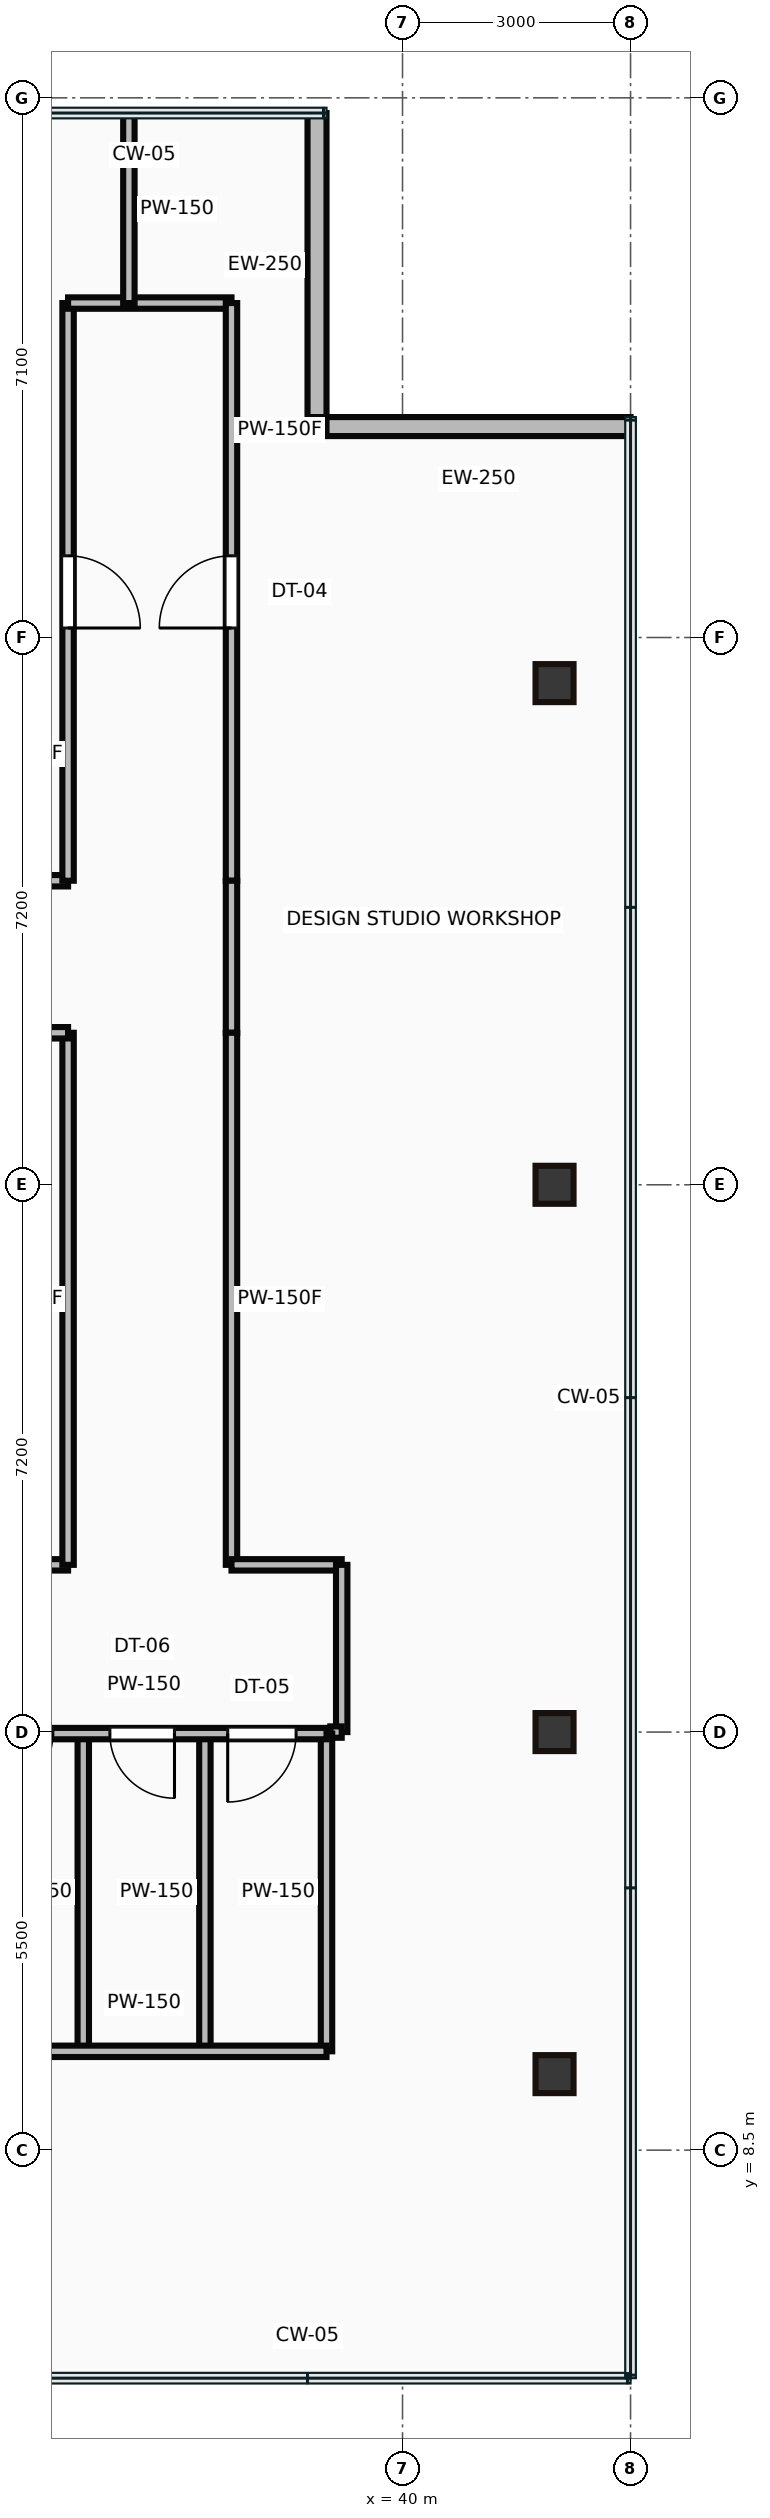
"""IFC4 building model, lengths in metres.
Left out: names, types, materials, properties, quantities, classifications, styles, units other than length and angle.
Written with IfcOpenShell. Run it as: python <this file> out.ifc"""

import sys

from ifc_helpers import new_model, si_unit, direction, frame, frame_2d, origin, origin_2d, place, context, subcontext, project, spatial, rectangle, hollow_rectangle, extrude, source, transform, mapped, element, fill, save


model = new_model("IFC4")
c1 = context("Model", 3, precision=1e-05, world=origin(), true_north=direction((0.0, 1.0)))
c2 = subcontext(c1, "Body", "Model", "MODEL_VIEW")
j1 = project(units=[si_unit("LENGTHUNIT", "METRE"), si_unit("PLANEANGLEUNIT", "RADIAN")], contexts=[c1])
p1 = place(None, origin())
s1 = spatial("IfcSite", under=j1, at=p1, CompositionType="ELEMENT")
p2 = place(p1, origin())
s2 = spatial("IfcBuilding", under=s1, at=p2, CompositionType="ELEMENT")
p3 = place(p2, frame((0.0, 0.0, 251.5)))
s3 = spatial("IfcBuildingStorey", under=s2, at=p3, CompositionType="ELEMENT", Elevation=251.5)
m1 = source(origin(), c2, "Body", "SweptSolid", [
    extrude(hollow_rectangle(XDim=0.5, YDim=0.5, WallThickness=0.022, at=origin_2d()), origin(), (0.0, 0.0, 1.0), 3.65),
])
for number, where, z_axis, x_axis in (
    (1, (42.0, 9.5, 0.0), (0.0, 0.0, 1.0), (1.0, 0.0, 0.0)),
    (2, (42.0, 14.0, 0.0), (0.0, 0.0, 1.0), (1.0, 0.0, 0.0)),
    (3, (42.0, 21.2, 0.0), (0.0, 0.0, 1.0), (1.0, 0.0, 0.0)),
    (4, (42.0, 27.8, 0.0), (0.0, 0.0, 1.0), (1.0, 0.0, 0.0)),
):
    element("IfcColumn", number, at=place(p3, frame(where, z_axis=z_axis, x_axis=x_axis)), inside=s3, PredefinedType="COLUMN", context=c2, shape_type="MappedRepresentation", body=[
        mapped(m1, transform((0.0, 0.0, 0.0))),
    ])
m2 = source(origin(), c2, "Body", "SweptSolid", [
    extrude(rectangle(XDim=4.0, YDim=0.25, at=frame_2d((2.0, 0.0))), origin(), (0.0, 0.0, 1.0), 3.4),
])
for number, where, z_axis, x_axis in (
    (5, (43.0, 31.175, 0.0), (0.0, 0.0, 1.0), (-1.0, 0.0, 0.0)),
    (6, (38.875, 31.3, 0.0), (0.0, 0.0, 1.0), (0.0, 1.0, 0.0)),
):
    element("IfcWall", number, at=place(p3, frame(where, z_axis=z_axis, x_axis=x_axis)), inside=s3, PredefinedType="STANDARD", context=c2, shape_type="MappedRepresentation", body=[
        mapped(m2, transform((0.0, 0.0, 0.0))),
    ])
m3 = source(origin(), c2, "Body", "SweptSolid", [
    extrude(rectangle(XDim=4.8, YDim=0.15, at=frame_2d((2.4, 0.0))), origin(), (0.0, 0.0, 1.0), 2.787),
])
p4 = place(p3, frame((34.2, 13.98, 0.0), z_axis=(0.0, 0.0, 1.0), x_axis=(1.0, 0.0, 0.0)))
e7 = element("IfcWall", 7, at=p4, inside=s3, PredefinedType="PARTITIONING", context=c2, shape_type="MappedRepresentation", body=[
    mapped(m3, transform((0.0, 0.0, 0.0))),
])
p5 = place(p4, frame((0.35, 0.0, 0.0)))
e8 = element("IfcOpeningElement", 8, at=p5, cuts=e7, PredefinedType="OPENING", context=c2, shape_type="SweptSolid", body=[
    extrude(rectangle(XDim=0.85, YDim=2.1, at=frame_2d((0.425, 1.05))), frame((0.0, 0.085, 0.0), z_axis=(0.0, -1.0, 0.0), x_axis=(1.0, 0.0, 0.0)), (0.0, 0.0, 1.0), 0.17),
])
p6 = place(p4, frame((1.95, 0.0, 0.0)))
e9 = element("IfcOpeningElement", 9, at=p6, cuts=e7, PredefinedType="OPENING", context=c2, shape_type="SweptSolid", body=[
    extrude(rectangle(XDim=0.85, YDim=2.1, at=frame_2d((0.425, 1.05))), frame((0.0, 0.085, 0.0), z_axis=(0.0, -1.0, 0.0), x_axis=(1.0, 0.0, 0.0)), (0.0, 0.0, 1.0), 0.17),
])
p7 = place(p4, frame((3.5, 0.0, 0.0)))
e10 = element("IfcOpeningElement", 10, at=p7, cuts=e7, PredefinedType="OPENING", context=c2, shape_type="SweptSolid", body=[
    extrude(rectangle(XDim=0.9, YDim=2.1, at=frame_2d((0.45, 1.05))), frame((0.0, 0.085, 0.0), z_axis=(0.0, -1.0, 0.0), x_axis=(1.0, 0.0, 0.0)), (0.0, 0.0, 1.0), 0.17),
])
m4 = source(origin(), c2, "Body", "SweptSolid", [
    extrude(rectangle(XDim=4.8, YDim=0.15, at=frame_2d((2.4, 0.0))), origin(), (0.0, 0.0, 1.0), 3.4),
])
p8 = place(p3, frame((34.2, 9.8, 0.0), z_axis=(0.0, 0.0, 1.0), x_axis=(1.0, 0.0, 0.0)))
e11 = element("IfcWall", 11, at=p8, inside=s3, PredefinedType="PARTITIONING", context=c2, shape_type="MappedRepresentation", body=[
    mapped(m4, transform((0.0, 0.0, 0.0))),
])
m5 = source(origin(), c2, "Body", "SweptSolid", [
    extrude(rectangle(XDim=4.18, YDim=0.15, at=frame_2d((2.09, 0.0))), origin(), (0.0, 0.0, 1.0), 3.4),
])
for number, where, z_axis, x_axis in (
    (12, (39.0, 9.8, 0.0), (0.0, 0.0, 1.0), (0.0, 1.0, 0.0)),
    (13, (35.8, 9.8, 0.0), (0.0, 0.0, 1.0), (0.0, 1.0, 0.0)),
    (14, (37.4, 9.8, 0.0), (0.0, 0.0, 1.0), (0.0, 1.0, 0.0)),
):
    element("IfcWall", number, at=place(p3, frame(where, z_axis=z_axis, x_axis=x_axis)), inside=s3, PredefinedType="PARTITIONING", context=c2, shape_type="MappedRepresentation", body=[
        mapped(m5, transform((0.0, 0.0, 0.0))),
    ])
m6 = source(origin(), c2, "Body", "SweptSolid", [
    extrude(rectangle(XDim=28.65, YDim=0.15, at=frame_2d((14.325, 0.0))), origin(), (0.0, 0.0, 1.0), 3.4),
])
p9 = place(p3, frame((6.95, 25.2, 0.0), z_axis=(0.0, 0.0, 1.0), x_axis=(1.0, 0.0, 0.0)))
e15 = element("IfcWall", 15, at=p9, inside=s3, PredefinedType="PARTITIONING", context=c2, shape_type="MappedRepresentation", body=[
    mapped(m6, transform((0.0, 0.0, 0.0))),
])
p10 = place(p9, frame((3.775, 0.0, 0.0)))
e16 = element("IfcOpeningElement", 16, at=p10, cuts=e15, PredefinedType="OPENING", context=c2, shape_type="SweptSolid", body=[
    extrude(rectangle(XDim=0.95, YDim=2.15, at=frame_2d((0.475, 1.075))), frame((0.0, 0.085, 0.0), z_axis=(0.0, -1.0, 0.0), x_axis=(1.0, 0.0, 0.0)), (0.0, 0.0, 1.0), 0.17),
])
p11 = place(p9, frame((11.175, 0.0, 0.0)))
e17 = element("IfcOpeningElement", 17, at=p11, cuts=e15, PredefinedType="OPENING", context=c2, shape_type="SweptSolid", body=[
    extrude(rectangle(XDim=0.95, YDim=2.15, at=frame_2d((0.475, 1.075))), frame((0.0, 0.085, 0.0), z_axis=(0.0, -1.0, 0.0), x_axis=(1.0, 0.0, 0.0)), (0.0, 0.0, 1.0), 0.17),
])
p12 = place(p9, frame((18.775, 0.0, 0.0)))
e18 = element("IfcOpeningElement", 18, at=p12, cuts=e15, PredefinedType="OPENING", context=c2, shape_type="SweptSolid", body=[
    extrude(rectangle(XDim=0.95, YDim=2.15, at=frame_2d((0.475, 1.075))), frame((0.0, 0.085, 0.0), z_axis=(0.0, -1.0, 0.0), x_axis=(1.0, 0.0, 0.0)), (0.0, 0.0, 1.0), 0.17),
])
m7 = source(origin(), c2, "Body", "SweptSolid", [
    extrude(rectangle(XDim=7.6, YDim=0.15, at=frame_2d((3.8, 0.0))), origin(), (0.0, 0.0, 1.0), 3.4),
])
p13 = place(p3, frame((35.6, 25.2, 0.0), z_axis=(0.0, 0.0, 1.0), x_axis=(0.0, 1.0, 0.0)))
e19 = element("IfcWall", 19, at=p13, inside=s3, PredefinedType="PARTITIONING", context=c2, shape_type="MappedRepresentation", body=[
    mapped(m7, transform((0.0, 0.0, 0.0))),
])
p14 = place(p13, frame((3.325, 0.0, 0.0)))
e20 = element("IfcOpeningElement", 20, at=p14, cuts=e19, PredefinedType="OPENING", context=c2, shape_type="SweptSolid", body=[
    extrude(rectangle(XDim=0.95, YDim=2.15, at=frame_2d((0.475, 1.075))), frame((0.0, 0.085, 0.0), z_axis=(0.0, -1.0, 0.0), x_axis=(1.0, 0.0, 0.0)), (0.0, 0.0, 1.0), 0.17),
])
m8 = source(origin(), c2, "Body", "SweptSolid", [
    extrude(rectangle(XDim=2.15, YDim=0.15, at=frame_2d((1.075, 0.0))), origin(), (0.0, 0.0, 1.0), 3.4),
])
p15 = place(p3, frame((35.6, 32.8, 0.0), z_axis=(0.0, 0.0, 1.0), x_axis=(1.0, 0.0, 0.0)))
e21 = element("IfcWall", 21, at=p15, inside=s3, PredefinedType="PARTITIONING", context=c2, shape_type="MappedRepresentation", body=[
    mapped(m8, transform((0.0, 0.0, 0.0))),
])
p16 = place(p3, frame((37.75, 32.8, 0.0), z_axis=(0.0, 0.0, 1.0), x_axis=(0.0, -1.0, 0.0)))
e22 = element("IfcWall", 22, at=p16, inside=s3, PredefinedType="PARTITIONING", context=c2, shape_type="MappedRepresentation", body=[
    mapped(m7, transform((0.0, 0.0, 0.0))),
])
p17 = place(p16, frame((3.325, 0.0, 0.0)))
e23 = element("IfcOpeningElement", 23, at=p17, cuts=e22, PredefinedType="OPENING", context=c2, shape_type="SweptSolid", body=[
    extrude(rectangle(XDim=0.95, YDim=2.15, at=frame_2d((0.475, 1.075))), frame((0.0, 0.085, 0.0), z_axis=(0.0, -1.0, 0.0), x_axis=(1.0, 0.0, 0.0)), (0.0, 0.0, 1.0), 0.17),
])
m9 = source(origin(), c2, "Body", "SweptSolid", [
    extrude(rectangle(XDim=2.0, YDim=0.15, at=frame_2d((1.0, 0.0))), origin(), (0.0, 0.0, 1.0), 3.4),
])
p18 = place(p3, frame((37.75, 25.2, 0.0), z_axis=(0.0, 0.0, 1.0), x_axis=(0.0, -1.0, 0.0)))
e24 = element("IfcWall", 24, at=p18, inside=s3, PredefinedType="PARTITIONING", context=c2, shape_type="MappedRepresentation", body=[
    mapped(m9, transform((0.0, 0.0, 0.0))),
])
m10 = source(origin(), c2, "Body", "SweptSolid", [
    extrude(rectangle(XDim=7.0, YDim=0.15, at=frame_2d((3.5, 0.0))), origin(), (0.0, 0.0, 1.0), 3.4),
])
p19 = place(p3, frame((37.75, 23.2, 0.0), z_axis=(0.0, 0.0, 1.0), x_axis=(0.0, -1.0, 0.0)))
e25 = element("IfcWall", 25, at=p19, inside=s3, PredefinedType="PARTITIONING", context=c2, shape_type="MappedRepresentation", body=[
    mapped(m10, transform((0.0, 0.0, 0.0))),
])
m11 = source(origin(), c2, "Body", "SweptSolid", [
    extrude(rectangle(XDim=1.45, YDim=0.15, at=frame_2d((0.725, 0.0))), origin(), (0.0, 0.0, 1.0), 3.4),
])
p20 = place(p3, frame((37.75, 16.2, 0.0), z_axis=(0.0, 0.0, 1.0), x_axis=(1.0, 0.0, 0.0)))
e26 = element("IfcWall", 26, at=p20, inside=s3, PredefinedType="PARTITIONING", context=c2, shape_type="MappedRepresentation", body=[
    mapped(m11, transform((0.0, 0.0, 0.0))),
])
m12 = source(origin(), c2, "Body", "SweptSolid", [
    extrude(rectangle(XDim=2.2, YDim=0.15, at=frame_2d((1.1, 0.0))), origin(), (0.0, 0.0, 1.0), 3.4),
])
p21 = place(p3, frame((39.2, 16.2, 0.0), z_axis=(0.0, 0.0, 1.0), x_axis=(0.0, -1.0, 0.0)))
e27 = element("IfcWall", 27, at=p21, inside=s3, PredefinedType="PARTITIONING", context=c2, shape_type="MappedRepresentation", body=[
    mapped(m12, transform((0.0, 0.0, 0.0))),
])
m13 = source(origin(), c2, "Body", "SweptSolid", [
    extrude(rectangle(XDim=0.15, YDim=0.15, at=frame_2d((0.075, 0.0))), origin(), (0.0, 0.0, 1.0), 3.4),
])
p22 = place(p3, frame((39.2, 14.0, 0.0), z_axis=(0.0, 0.0, 1.0), x_axis=(-1.0, 0.0, 0.0)))
e28 = element("IfcWall", 28, at=p22, inside=s3, PredefinedType="PARTITIONING", context=c2, shape_type="MappedRepresentation", body=[
    mapped(m13, transform((0.0, 0.0, 0.0))),
])
p23 = place(p3, frame((6.95, 16.2, 0.0), z_axis=(0.0, 0.0, 1.0), x_axis=(1.0, 0.0, 0.0)))
e29 = element("IfcWall", 29, at=p23, inside=s3, PredefinedType="PARTITIONING", context=c2, shape_type="MappedRepresentation", body=[
    mapped(m6, transform((0.0, 0.0, 0.0))),
])
p24 = place(p23, frame((21.445, 0.0, 0.0)))
e30 = element("IfcOpeningElement", 30, at=p24, cuts=e29, PredefinedType="OPENING", context=c2, shape_type="SweptSolid", body=[
    extrude(rectangle(XDim=0.95, YDim=2.15, at=frame_2d((0.475, 1.075))), frame((0.0, 0.085, 0.0), z_axis=(0.0, -1.0, 0.0), x_axis=(1.0, 0.0, 0.0)), (0.0, 0.0, 1.0), 0.17),
])
p25 = place(p3, frame((35.6, 16.2, 0.0), z_axis=(0.0, 0.0, 1.0), x_axis=(0.0, 1.0, 0.0)))
e31 = element("IfcWall", 31, at=p25, inside=s3, PredefinedType="PARTITIONING", context=c2, shape_type="MappedRepresentation", body=[
    mapped(m10, transform((0.0, 0.0, 0.0))),
])
p26 = place(p3, frame((35.6, 23.2, 0.0), z_axis=(0.0, 0.0, 1.0), x_axis=(-1.0, 0.0, 0.0)))
e32 = element("IfcWall", 32, at=p26, inside=s3, PredefinedType="PARTITIONING", context=c2, shape_type="MappedRepresentation", body=[
    mapped(m6, transform((0.0, 0.0, 0.0))),
])
p27 = place(p26, frame((24.12, 0.0, 0.0)))
e33 = element("IfcOpeningElement", 33, at=p27, cuts=e32, PredefinedType="OPENING", context=c2, shape_type="SweptSolid", body=[
    extrude(rectangle(XDim=0.95, YDim=2.15, at=frame_2d((0.475, 1.075))), frame((0.0, 0.085, 0.0), z_axis=(0.0, -1.0, 0.0), x_axis=(1.0, 0.0, 0.0)), (0.0, 0.0, 1.0), 0.17),
])
p28 = place(p26, frame((16.525, 0.0, 0.0)))
e34 = element("IfcOpeningElement", 34, at=p28, cuts=e32, PredefinedType="OPENING", context=c2, shape_type="SweptSolid", body=[
    extrude(rectangle(XDim=0.95, YDim=2.15, at=frame_2d((0.475, 1.075))), frame((0.0, 0.085, 0.0), z_axis=(0.0, -1.0, 0.0), x_axis=(1.0, 0.0, 0.0)), (0.0, 0.0, 1.0), 0.17),
])
m14 = source(origin(), c2, "Body", "SweptSolid", [
    extrude(rectangle(XDim=2.48, YDim=0.15, at=frame_2d((1.24, 0.0))), origin(), (0.0, 0.0, 1.0), 3.4),
])
p29 = place(p3, frame((36.4, 35.28, 0.0), z_axis=(0.0, 0.0, 1.0), x_axis=(0.0, -1.0, 0.0)))
e35 = element("IfcWall", 35, at=p29, inside=s3, PredefinedType="PARTITIONING", context=c2, shape_type="MappedRepresentation", body=[
    mapped(m14, transform((0.0, 0.0, 0.0))),
])
m15 = source(origin(), c2, "Body", "SweptSolid", [
    extrude(rectangle(XDim=0.85, YDim=2.1, at=frame_2d((0.425, 1.05))), frame((0.0, 0.025, 0.0), z_axis=(0.0, -1.0, 0.0), x_axis=(1.0, 0.0, 0.0)), (0.0, 0.0, 1.0), 0.05),
])
p30 = place(p5, frame((0.85, 0.0, 0.0), z_axis=(0.0, 0.0, 1.0), x_axis=(-1.0, 0.0, 0.0)))
e36 = element("IfcDoor", 36, at=p30, inside=s3, OperationType="SINGLE_SWING_LEFT", PredefinedType="DOOR", context=c2, shape_type="MappedRepresentation", body=[
    mapped(m15, transform((0.0, 0.0, 0.0))),
])
fill(e8, e36)
p31 = place(p6, frame((0.85, 0.0, 0.0), z_axis=(0.0, 0.0, 1.0), x_axis=(-1.0, 0.0, 0.0)))
e37 = element("IfcDoor", 37, at=p31, inside=s3, OperationType="SINGLE_SWING_RIGHT", PredefinedType="DOOR", context=c2, shape_type="MappedRepresentation", body=[
    mapped(m15, transform((0.0, 0.0, 0.0))),
])
fill(e9, e37)
m16 = source(origin(), c2, "Body", "SweptSolid", [
    extrude(rectangle(XDim=0.9, YDim=2.1, at=frame_2d((0.45, 1.05))), frame((0.0, 0.025, 0.0), z_axis=(0.0, -1.0, 0.0), x_axis=(1.0, 0.0, 0.0)), (0.0, 0.0, 1.0), 0.05),
])
p32 = place(p7, frame((0.9, 0.0, 0.0), z_axis=(0.0, 0.0, 1.0), x_axis=(-1.0, 0.0, 0.0)))
e38 = element("IfcDoor", 38, at=p32, inside=s3, OperationType="SINGLE_SWING_LEFT", PredefinedType="DOOR", context=c2, shape_type="MappedRepresentation", body=[
    mapped(m16, transform((0.0, 0.0, 0.0))),
])
fill(e10, e38)
m17 = source(origin(), c2, "Body", "SweptSolid", [
    extrude(rectangle(XDim=0.95, YDim=2.15, at=frame_2d((0.475, 1.075))), frame((0.0, 0.025, 0.0), z_axis=(0.0, -1.0, 0.0), x_axis=(1.0, 0.0, 0.0)), (0.0, 0.0, 1.0), 0.05),
])
p33 = place(p14, origin())
e39 = element("IfcDoor", 39, at=p33, inside=s3, OperationType="SINGLE_SWING_LEFT", PredefinedType="DOOR", context=c2, shape_type="MappedRepresentation", body=[
    mapped(m17, transform((0.0, 0.0, 0.0))),
])
fill(e20, e39)
p34 = place(p17, origin())
e40 = element("IfcDoor", 40, at=p34, inside=s3, OperationType="SINGLE_SWING_RIGHT", PredefinedType="DOOR", context=c2, shape_type="MappedRepresentation", body=[
    mapped(m17, transform((0.0, 0.0, 0.0))),
])
fill(e23, e40)
save(model, sys.argv[1])
